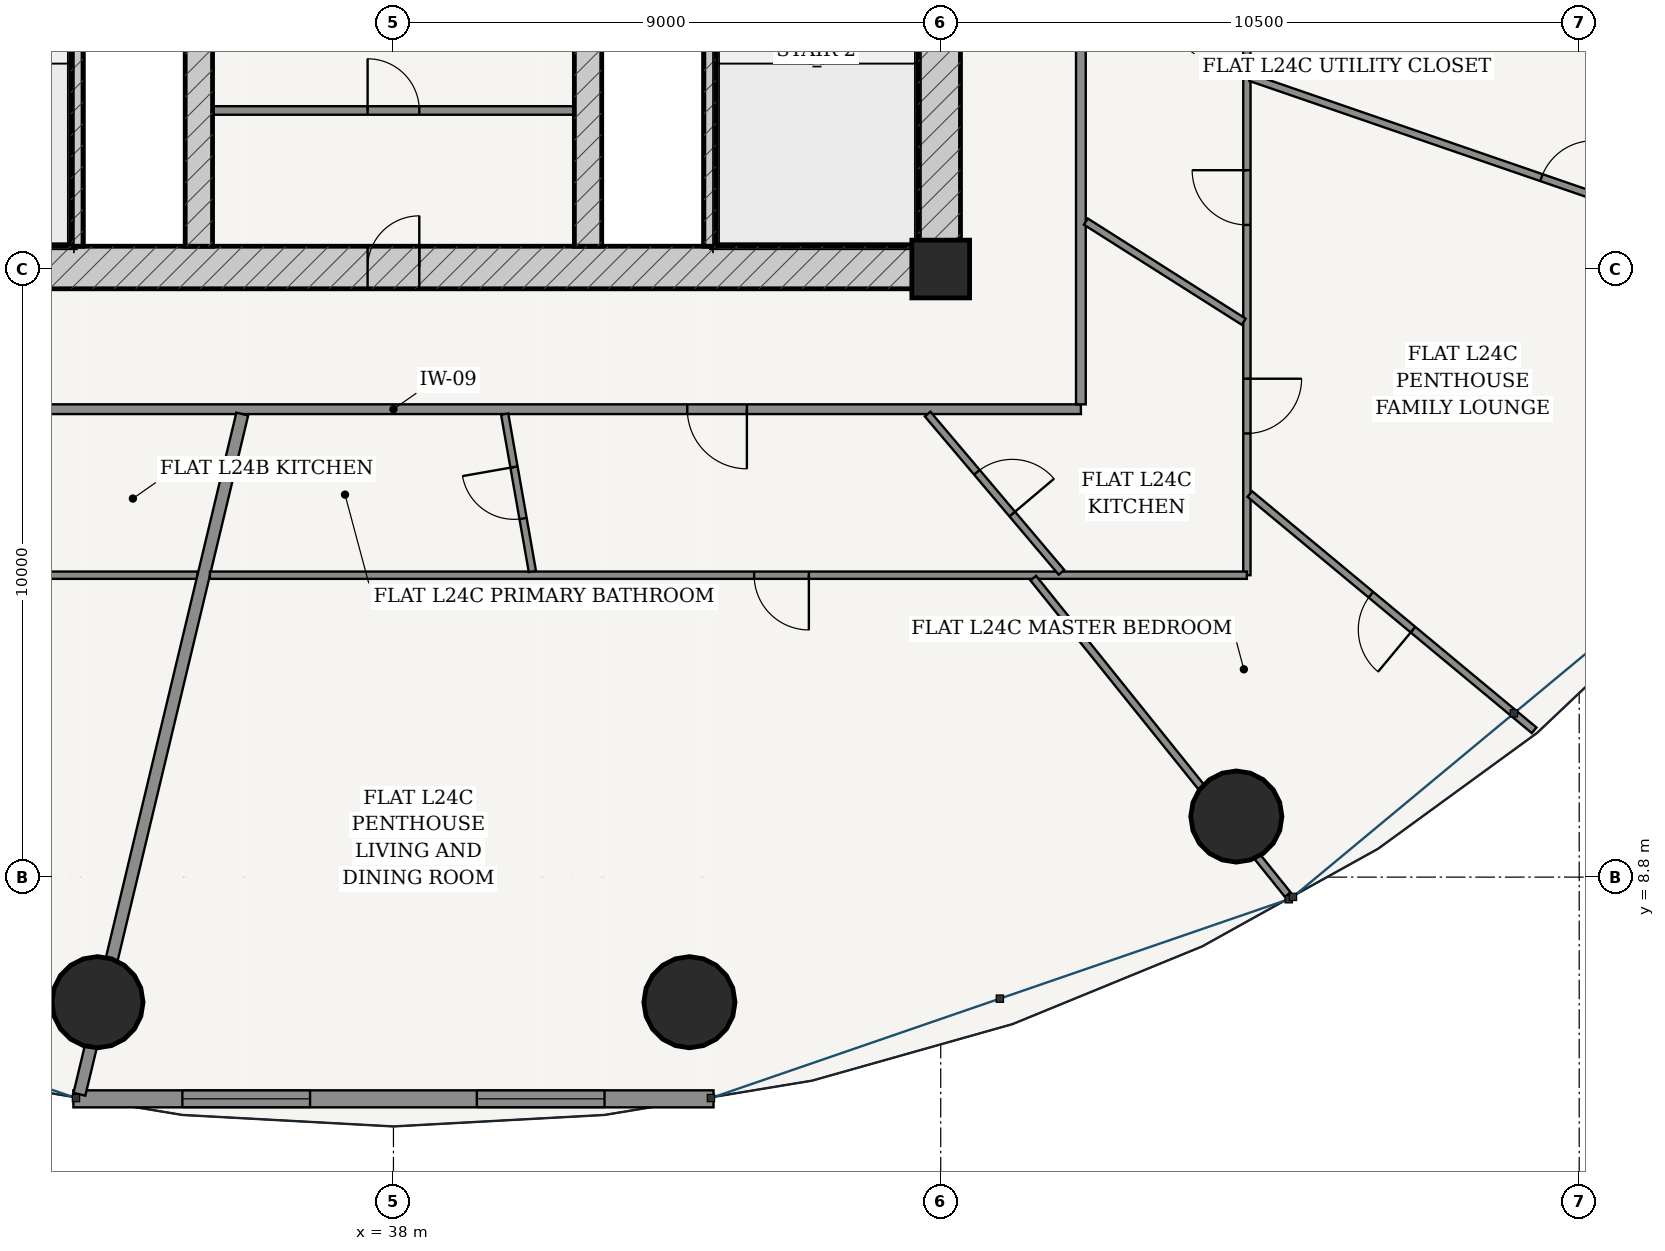
"""IFC4 building model, lengths in metres.
Left out: names, types, materials, properties, quantities, classifications, styles, units other than length and angle.
Written with IfcOpenShell. Run it as: python <this file> out.ifc"""

import sys

from ifc_helpers import new_model, si_unit, direction, frame, frame_2d, origin, origin_2d, place, context, subcontext, project, spatial, rectangle, hollow_circle, extrude, source, transform, mapped, element, fill, save


model = new_model("IFC4")
c1 = context("Model", 3, precision=1e-05, world=origin(), true_north=direction((-0.2419218956, 0.970295726276)))
c2 = subcontext(c1, "Body", "Model", "MODEL_VIEW")
j1 = project(units=[si_unit("LENGTHUNIT", "METRE"), si_unit("PLANEANGLEUNIT", "RADIAN")], contexts=[c1])
p1 = place(None, origin())
s1 = spatial("IfcSite", under=j1, at=p1, CompositionType="ELEMENT")
p2 = place(p1, origin())
s2 = spatial("IfcBuilding", under=s1, at=p2, CompositionType="ELEMENT")
p3 = place(p2, frame((0.0, 0.0, 94.2)))
s3 = spatial("IfcBuildingStorey", under=s2, at=p3, CompositionType="ELEMENT", Elevation=94.2)
p4 = place(p3, frame((47.0, 18.8, 0.0), z_axis=(0.0, 0.0, 1.0), x_axis=(1.0, 0.0, 0.0)))
e1 = element("IfcColumn", 1, at=p4, inside=s3, PredefinedType="COLUMN", context=c2, shape_type="SweptSolid", body=[
    extrude(rectangle(XDim=0.95, YDim=0.95, at=origin_2d()), origin(), (0.0, 0.0, 1.0), 3.6),
])
p5 = place(p3, frame((28.675, 18.825, 0.0), z_axis=(0.0, 0.0, 1.0), x_axis=(1.0, 0.0, 0.0)))
e2 = element("IfcWall", 2, at=p5, inside=s3, PredefinedType="SHEAR", context=c2, shape_type="SweptSolid", body=[
    extrude(rectangle(XDim=18.65, YDim=0.7, at=frame_2d((9.325, 0.0))), origin(), (0.0, 0.0, 1.0), 3.325),
])
p6 = place(p5, frame((8.9, 0.0, 0.0)))
e3 = element("IfcOpeningElement", 3, at=p6, cuts=e2, PredefinedType="OPENING", context=c2, shape_type="SweptSolid", body=[
    extrude(rectangle(XDim=0.85, YDim=2.1, at=frame_2d((0.425, 1.05))), frame((0.0, 0.36, 0.0), z_axis=(0.0, -1.0, 0.0), x_axis=(1.0, 0.0, 0.0)), (0.0, 0.0, 1.0), 0.72),
])
p7 = place(p3, frame((46.975, 19.175, 0.0), z_axis=(0.0, 0.0, 1.0), x_axis=(0.0, 1.0, 0.0)))
e4 = element("IfcWall", 4, at=p7, inside=s3, PredefinedType="SHEAR", context=c2, shape_type="SweptSolid", body=[
    extrude(rectangle(XDim=15.25, YDim=0.7, at=frame_2d((7.625, 0.0))), origin(), (0.0, 0.0, 1.0), 3.325),
])
p8 = place(p7, frame((9.875, 0.0, 0.0)))
e5 = element("IfcOpeningElement", 5, at=p8, cuts=e4, PredefinedType="OPENING", context=c2, shape_type="SweptSolid", body=[
    extrude(rectangle(XDim=1.5, YDim=2.2, at=frame_2d((0.75, 1.1))), frame((0.0, 0.36, 0.0), z_axis=(0.0, -1.0, 0.0), x_axis=(1.0, 0.0, 0.0)), (0.0, 0.0, 1.0), 0.72),
])
for number, where, z_axis, x_axis in (
    (6, (32.795, 19.175, 0.0), (0.0, 0.0, 1.0), (0.0, 1.0, 0.0)),
    (7, (43.205, 19.175, 0.0), (0.0, 0.0, 1.0), (0.0, 1.0, 0.0)),
):
    element("IfcWall", number, at=place(p3, frame(where, z_axis=z_axis, x_axis=x_axis)), inside=s3, PredefinedType="SOLIDWALL", context=c2, shape_type="SweptSolid", body=[
        extrude(rectangle(XDim=7.375, YDim=0.2, at=frame_2d((3.688, 0.0))), origin(), (0.0, 0.0, 1.0), 3.325),
    ])
p9 = place(p3, frame((34.8, 19.175, 0.0), z_axis=(0.0, 0.0, 1.0), x_axis=(0.0, 1.0, 0.0)))
e8 = element("IfcWall", 8, at=p9, inside=s3, PredefinedType="SHEAR", context=c2, shape_type="SweptSolid", body=[
    extrude(rectangle(XDim=15.25, YDim=0.45, at=frame_2d((7.625, 0.0))), origin(), (0.0, 0.0, 1.0), 3.325),
])
p10 = place(p9, frame((7.8, 0.0, 0.0)))
e9 = element("IfcOpeningElement", 9, at=p10, cuts=e8, PredefinedType="OPENING", context=c2, shape_type="SweptSolid", body=[
    extrude(rectangle(XDim=1.05, YDim=2.15, at=frame_2d((0.525, 1.075))), frame((0.0, 0.235, 0.0), z_axis=(0.0, -1.0, 0.0), x_axis=(1.0, 0.0, 0.0)), (0.0, 0.0, 1.0), 0.47),
])
p11 = place(p3, frame((41.2, 19.175, 0.0), z_axis=(0.0, 0.0, 1.0), x_axis=(0.0, 1.0, 0.0)))
e10 = element("IfcWall", 10, at=p11, inside=s3, PredefinedType="SHEAR", context=c2, shape_type="SweptSolid", body=[
    extrude(rectangle(XDim=15.25, YDim=0.45, at=frame_2d((7.625, 0.0))), origin(), (0.0, 0.0, 1.0), 3.325),
])
p12 = place(p11, frame((7.8, 0.0, 0.0)))
e11 = element("IfcOpeningElement", 11, at=p12, cuts=e10, PredefinedType="OPENING", context=c2, shape_type="SweptSolid", body=[
    extrude(rectangle(XDim=1.05, YDim=2.15, at=frame_2d((0.525, 1.075))), frame((0.0, 0.235, 0.0), z_axis=(0.0, -1.0, 0.0), x_axis=(1.0, 0.0, 0.0)), (0.0, 0.0, 1.0), 0.47),
])
for number, where, z_axis, x_axis in (
    (12, (33.133, 6.743, 0.0), (0.0, 0.0, 1.0), (1.0, 0.0, 0.0)),
    (13, (42.867, 6.743, 0.0), (0.0, 0.0, 1.0), (1.0, 0.0, 0.0)),
    (14, (51.862, 9.796, 0.0), (0.0, 0.0, 1.0), (1.0, 0.0, 0.0)),
):
    element("IfcColumn", number, at=place(p3, frame(where, z_axis=z_axis, x_axis=x_axis)), inside=s3, PredefinedType="COLUMN", context=c2, shape_type="SweptSolid", body=[
        extrude(hollow_circle(Radius=0.75, WallThickness=0.045, at=origin_2d()), origin(), (0.0, 0.0, 1.0), 3.6),
    ])
p13 = place(p3, frame((32.736, 5.154, 0.0), z_axis=(0.0, 0.0, 1.0), x_axis=(1.0, 0.0, 0.0)))
e15 = element("IfcWall", 15, at=p13, inside=s3, PredefinedType="SOLIDWALL", context=c2, shape_type="SweptSolid", body=[
    extrude(rectangle(XDim=10.527, YDim=0.28, at=frame_2d((5.264, 0.0))), origin(), (0.0, 0.0, 1.0), 3.325),
])
p14 = place(p13, frame((1.792, 0.0, 0.85)))
e16 = element("IfcOpeningElement", 16, at=p14, cuts=e15, PredefinedType="OPENING", context=c2, shape_type="SweptSolid", body=[
    extrude(rectangle(XDim=2.1, YDim=1.95, at=frame_2d((1.05, 0.975))), frame((0.0, 0.15, 0.0), z_axis=(0.0, -1.0, 0.0), x_axis=(1.0, 0.0, 0.0)), (0.0, 0.0, 1.0), 0.3),
])
p15 = place(p13, frame((6.635, 0.0, 0.85)))
e17 = element("IfcOpeningElement", 17, at=p15, cuts=e15, PredefinedType="OPENING", context=c2, shape_type="SweptSolid", body=[
    extrude(rectangle(XDim=2.1, YDim=1.95, at=frame_2d((1.05, 0.975))), frame((0.0, 0.15, 0.0), z_axis=(0.0, -1.0, 0.0), x_axis=(1.0, 0.0, 0.0)), (0.0, 0.0, 1.0), 0.3),
])
p16 = place(p3, frame((35.025, 21.407, 0.0), z_axis=(0.0, 0.0, 1.0), x_axis=(1.0, 0.0, 0.0)))
e18 = element("IfcWall", 18, at=p16, inside=s3, PredefinedType="PARTITIONING", context=c2, shape_type="SweptSolid", body=[
    extrude(rectangle(XDim=5.95, YDim=0.14, at=frame_2d((2.975, 0.0))), origin(), (0.0, 0.0, 1.0), 3.325),
])
p17 = place(p16, frame((2.55, 0.0, 0.0)))
e19 = element("IfcOpeningElement", 19, at=p17, cuts=e18, PredefinedType="OPENING", context=c2, shape_type="SweptSolid", body=[
    extrude(rectangle(XDim=0.85, YDim=2.1, at=frame_2d((0.425, 1.05))), frame((0.0, 0.08, 0.0), z_axis=(0.0, -1.0, 0.0), x_axis=(1.0, 0.0, 0.0)), (0.0, 0.0, 1.0), 0.16),
])
p18 = place(p3, frame((26.695, 16.495, 0.0), z_axis=(0.0, 0.0, 1.0), x_axis=(1.0, 0.0, 0.0)))
e20 = element("IfcWall", 20, at=p18, inside=s3, PredefinedType="PARTITIONING", context=c2, shape_type="SweptSolid", body=[
    extrude(rectangle(XDim=22.61, YDim=0.16, at=frame_2d((11.305, 0.0))), origin(), (0.0, 0.0, 1.0), 2.767),
])
p19 = place(p18, frame((1.688, 0.0, 0.0)))
e21 = element("IfcOpeningElement", 21, at=p19, cuts=e20, PredefinedType="OPENING", context=c2, shape_type="SweptSolid", body=[
    extrude(rectangle(XDim=0.98, YDim=2.2, at=frame_2d((0.49, 1.1))), frame((0.0, 0.09, 0.0), z_axis=(0.0, -1.0, 0.0), x_axis=(1.0, 0.0, 0.0)), (0.0, 0.0, 1.0), 0.18),
])
p20 = place(p18, frame((16.137, 0.0, 0.0)))
e22 = element("IfcOpeningElement", 22, at=p20, cuts=e20, PredefinedType="OPENING", context=c2, shape_type="SweptSolid", body=[
    extrude(rectangle(XDim=0.98, YDim=2.2, at=frame_2d((0.49, 1.1))), frame((0.0, 0.09, 0.0), z_axis=(0.0, -1.0, 0.0), x_axis=(1.0, 0.0, 0.0)), (0.0, 0.0, 1.0), 0.18),
])
p21 = place(p3, frame((49.305, 16.575, 0.0), z_axis=(0.0, 0.0, 1.0), x_axis=(0.0, 1.0, 0.0)))
e23 = element("IfcWall", 23, at=p21, inside=s3, PredefinedType="PARTITIONING", context=c2, shape_type="SweptSolid", body=[
    extrude(rectangle(XDim=20.45, YDim=0.16, at=frame_2d((10.225, 0.0))), origin(), (0.0, 0.0, 1.0), 2.767),
])
p22 = place(p3, frame((34.777, 13.765, 0.0), z_axis=(0.0, 0.0, 1.0), x_axis=(-1.0, 0.0, 0.0)))
e24 = element("IfcWall", 24, at=p22, inside=s3, PredefinedType="PARTITIONING", context=c2, shape_type="SweptSolid", body=[
    extrude(rectangle(XDim=10.812, YDim=0.12, at=frame_2d((5.406, 0.0))), origin(), (0.0, 0.0, 1.0), 2.767),
])
p23 = place(p22, frame((8.466, 0.0, 0.0)))
e25 = element("IfcOpeningElement", 25, at=p23, cuts=e24, PredefinedType="OPENING", context=c2, shape_type="SweptSolid", body=[
    extrude(rectangle(XDim=0.9, YDim=2.15, at=frame_2d((0.45, 1.075))), frame((0.0, 0.07, 0.0), z_axis=(0.0, -1.0, 0.0), x_axis=(1.0, 0.0, 0.0)), (0.0, 0.0, 1.0), 0.14),
])
p24 = place(p22, frame((2.628, 0.0, 0.0)))
e26 = element("IfcOpeningElement", 26, at=p24, cuts=e24, PredefinedType="OPENING", context=c2, shape_type="SweptSolid", body=[
    extrude(rectangle(XDim=0.9, YDim=2.15, at=frame_2d((0.45, 1.075))), frame((0.0, 0.07, 0.0), z_axis=(0.0, -1.0, 0.0), x_axis=(1.0, 0.0, 0.0)), (0.0, 0.0, 1.0), 0.14),
])
p25 = place(p3, frame((35.514, 16.415, 0.0), z_axis=(0.0, 0.0, 1.0), x_axis=(-0.232829417917, -0.972517589636, 0.0)))
e27 = element("IfcWall", 27, at=p25, inside=s3, PredefinedType="PARTITIONING", context=c2, shape_type="SweptSolid", body=[
    extrude(rectangle(XDim=11.502, YDim=0.2, at=frame_2d((5.751, 0.0))), origin(), (0.0, 0.0, 1.0), 2.767),
])
p26 = place(p3, frame((52.035, 34.49, 0.0), z_axis=(0.0, 0.0, 1.0), x_axis=(0.0, -1.0, 0.0)))
e28 = element("IfcWall", 28, at=p26, inside=s3, PredefinedType="PARTITIONING", context=c2, shape_type="SweptSolid", body=[
    extrude(rectangle(XDim=20.725, YDim=0.12, at=frame_2d((10.362, 0.0))), origin(), (0.0, 0.0, 1.0), 2.767),
])
p27 = place(p26, frame((17.493, 0.0, 0.0)))
e29 = element("IfcOpeningElement", 29, at=p27, cuts=e28, PredefinedType="OPENING", context=c2, shape_type="SweptSolid", body=[
    extrude(rectangle(XDim=0.9, YDim=2.15, at=frame_2d((0.45, 1.075))), frame((0.0, 0.07, 0.0), z_axis=(0.0, -1.0, 0.0), x_axis=(1.0, 0.0, 0.0)), (0.0, 0.0, 1.0), 0.14),
])
p28 = place(p26, frame((14.064, 0.0, 0.0)))
e30 = element("IfcOpeningElement", 30, at=p28, cuts=e28, PredefinedType="OPENING", context=c2, shape_type="SweptSolid", body=[
    extrude(rectangle(XDim=0.9, YDim=2.15, at=frame_2d((0.45, 1.075))), frame((0.0, 0.07, 0.0), z_axis=(0.0, -1.0, 0.0), x_axis=(1.0, 0.0, 0.0)), (0.0, 0.0, 1.0), 0.14),
])
p29 = place(p3, frame((52.035, 13.765, 0.0), z_axis=(0.0, 0.0, 1.0), x_axis=(-1.0, 0.0, 0.0)))
e31 = element("IfcWall", 31, at=p29, inside=s3, PredefinedType="PARTITIONING", context=c2, shape_type="SweptSolid", body=[
    extrude(rectangle(XDim=17.054, YDim=0.12, at=frame_2d((8.527, 0.0))), origin(), (0.0, 0.0, 1.0), 2.767),
])
p30 = place(p29, frame((7.203, 0.0, 0.0)))
e32 = element("IfcOpeningElement", 32, at=p30, cuts=e31, PredefinedType="OPENING", context=c2, shape_type="SweptSolid", body=[
    extrude(rectangle(XDim=0.9, YDim=2.15, at=frame_2d((0.45, 1.075))), frame((0.0, 0.07, 0.0), z_axis=(0.0, -1.0, 0.0), x_axis=(1.0, 0.0, 0.0)), (0.0, 0.0, 1.0), 0.14),
])
p31 = place(p3, frame((48.522, 13.717, 0.0), z_axis=(0.0, 0.0, 1.0), x_axis=(0.626707979732, -0.77925419995, 0.0)))
e33 = element("IfcWall", 33, at=p31, inside=s3, PredefinedType="PARTITIONING", context=c2, shape_type="SweptSolid", body=[
    extrude(rectangle(XDim=6.679, YDim=0.12, at=frame_2d((3.339, 0.0))), origin(), (0.0, 0.0, 1.0), 2.767),
])
p32 = place(p3, frame((52.083, 15.1, 0.0), z_axis=(0.0, 0.0, 1.0), x_axis=(0.769161827891, -0.63905405289, 0.0)))
e34 = element("IfcWall", 34, at=p32, inside=s3, PredefinedType="PARTITIONING", context=c2, shape_type="SweptSolid", body=[
    extrude(rectangle(XDim=6.08, YDim=0.12, at=frame_2d((3.04, 0.0))), origin(), (0.0, 0.0, 1.0), 2.767),
])
p33 = place(p32, frame((2.59, 0.0, 0.0)))
e35 = element("IfcOpeningElement", 35, at=p33, cuts=e34, PredefinedType="OPENING", context=c2, shape_type="SweptSolid", body=[
    extrude(rectangle(XDim=0.9, YDim=2.15, at=frame_2d((0.45, 1.075))), frame((0.0, 0.07, 0.0), z_axis=(0.0, -1.0, 0.0), x_axis=(1.0, 0.0, 0.0)), (0.0, 0.0, 1.0), 0.14),
])
p34 = place(p3, frame((52.094, 21.95, 0.0), z_axis=(0.0, 0.0, 1.0), x_axis=(0.945573120726, -0.32540970078, 0.0)))
e36 = element("IfcWall", 36, at=p34, inside=s3, PredefinedType="PARTITIONING", context=c2, shape_type="SweptSolid", body=[
    extrude(rectangle(XDim=11.022, YDim=0.12, at=frame_2d((5.511, 0.0))), origin(), (0.0, 0.0, 1.0), 2.767),
])
p35 = place(p34, frame((5.061, 0.0, 0.0)))
e37 = element("IfcOpeningElement", 37, at=p35, cuts=e36, PredefinedType="OPENING", context=c2, shape_type="SweptSolid", body=[
    extrude(rectangle(XDim=0.9, YDim=2.15, at=frame_2d((0.45, 1.075))), frame((0.0, 0.07, 0.0), z_axis=(0.0, -1.0, 0.0), x_axis=(1.0, 0.0, 0.0)), (0.0, 0.0, 1.0), 0.14),
])
p36 = place(p3, frame((39.829, 16.415, 0.0), z_axis=(0.0, 0.0, 1.0), x_axis=(0.173488627881, -0.984835872618, 0.0)))
e38 = element("IfcWall", 38, at=p36, inside=s3, PredefinedType="PARTITIONING", context=c2, shape_type="SweptSolid", body=[
    extrude(rectangle(XDim=2.629, YDim=0.12, at=frame_2d((1.314, 0.0))), origin(), (0.0, 0.0, 1.0), 3.325),
])
p37 = place(p36, frame((0.885, 0.0, 0.0)))
e39 = element("IfcOpeningElement", 39, at=p37, cuts=e38, PredefinedType="OPENING", context=c2, shape_type="SweptSolid", body=[
    extrude(rectangle(XDim=0.86, YDim=2.15, at=frame_2d((0.43, 1.075))), frame((0.0, 0.07, 0.0), z_axis=(0.0, -1.0, 0.0), x_axis=(1.0, 0.0, 0.0)), (0.0, 0.0, 1.0), 0.14),
])
p38 = place(p3, frame((46.785, 16.415, 0.0), z_axis=(0.0, 0.0, 1.0), x_axis=(0.64582345164, -0.76348678398, 0.0)))
e40 = element("IfcWall", 40, at=p38, inside=s3, PredefinedType="PARTITIONING", context=c2, shape_type="SweptSolid", body=[
    extrude(rectangle(XDim=3.409, YDim=0.12, at=frame_2d((1.705, 0.0))), origin(), (0.0, 0.0, 1.0), 3.004),
])
p39 = place(p38, frame((1.254, 0.0, 0.0)))
e41 = element("IfcOpeningElement", 41, at=p39, cuts=e40, PredefinedType="OPENING", context=c2, shape_type="SweptSolid", body=[
    extrude(rectangle(XDim=0.9, YDim=2.15, at=frame_2d((0.45, 1.075))), frame((0.0, 0.07, 0.0), z_axis=(0.0, -1.0, 0.0), x_axis=(1.0, 0.0, 0.0)), (0.0, 0.0, 1.0), 0.14),
])
p40 = place(p3, frame((49.387, 19.58, 0.0), z_axis=(0.0, 0.0, 1.0), x_axis=(0.844540118368, -0.535492286094, 0.0)))
e42 = element("IfcWall", 42, at=p40, inside=s3, PredefinedType="PARTITIONING", context=c2, shape_type="SweptSolid", body=[
    extrude(rectangle(XDim=3.074, YDim=0.12, at=frame_2d((1.537, 0.0))), origin(), (0.0, 0.0, 1.0), 3.325),
])
m1 = source(origin(), c2, "Body", "SweptSolid", [
    extrude(rectangle(XDim=2.1, YDim=1.95, at=frame_2d((1.05, 0.975))), frame((0.0, 0.03, 0.0), z_axis=(0.0, -1.0, 0.0), x_axis=(1.0, 0.0, 0.0)), (0.0, 0.0, 1.0), 0.06),
])
p41 = place(p14, origin())
e43 = element("IfcWindow", 43, at=p41, inside=s3, PartitioningType="SINGLE_PANEL", PredefinedType="WINDOW", context=c2, shape_type="MappedRepresentation", body=[
    mapped(m1, transform((0.0, 0.0, 0.0), scale=1.0)),
])
fill(e16, e43)
p42 = place(p15, origin())
e44 = element("IfcWindow", 44, at=p42, inside=s3, PartitioningType="SINGLE_PANEL", PredefinedType="WINDOW", context=c2, shape_type="MappedRepresentation", body=[
    mapped(m1, transform((0.0, 0.0, 0.0), scale=1.0)),
])
fill(e17, e44)
m2 = source(origin(), c2, "Body", "SweptSolid", [
    extrude(rectangle(XDim=0.85, YDim=2.1, at=frame_2d((0.425, 1.05))), frame((0.0, 0.025, 0.0), z_axis=(0.0, -1.0, 0.0), x_axis=(1.0, 0.0, 0.0)), (0.0, 0.0, 1.0), 0.05),
])
p43 = place(p6, origin())
e45 = element("IfcDoor", 45, at=p43, inside=s3, OperationType="SINGLE_SWING_RIGHT", PredefinedType="DOOR", context=c2, shape_type="MappedRepresentation", body=[
    mapped(m2, transform((0.0, 0.0, 0.0), scale=1.0)),
])
fill(e3, e45)
p44 = place(p17, origin())
e46 = element("IfcDoor", 46, at=p44, inside=s3, OperationType="SINGLE_SWING_LEFT", PredefinedType="DOOR", context=c2, shape_type="MappedRepresentation", body=[
    mapped(m2, transform((0.0, 0.0, 0.0), scale=1.0)),
])
fill(e19, e46)
m3 = source(origin(), c2, "Body", "SweptSolid", [
    extrude(rectangle(XDim=0.98, YDim=2.2, at=frame_2d((0.49, 1.1))), frame((0.0, 0.025, 0.0), z_axis=(0.0, -1.0, 0.0), x_axis=(1.0, 0.0, 0.0)), (0.0, 0.0, 1.0), 0.05),
])
p45 = place(p20, frame((0.98, 0.0, 0.0), z_axis=(0.0, 0.0, 1.0), x_axis=(-1.0, 0.0, 0.0)))
e47 = element("IfcDoor", 47, at=p45, inside=s3, OperationType="SINGLE_SWING_LEFT", PredefinedType="DOOR", context=c2, shape_type="MappedRepresentation", body=[
    mapped(m3, transform((0.0, 0.0, 0.0), scale=1.0)),
])
fill(e22, e47)
m4 = source(origin(), c2, "Body", "SweptSolid", [
    extrude(rectangle(XDim=0.86, YDim=2.15, at=frame_2d((0.43, 1.075))), frame((0.0, 0.025, 0.0), z_axis=(0.0, -1.0, 0.0), x_axis=(1.0, 0.0, 0.0)), (0.0, 0.0, 1.0), 0.05),
])
p46 = place(p37, frame((0.86, 0.0, 0.0), z_axis=(0.0, 0.0, 1.0), x_axis=(-1.0, 0.0, 0.0)))
e48 = element("IfcDoor", 48, at=p46, inside=s3, OperationType="SINGLE_SWING_RIGHT", PredefinedType="DOOR", context=c2, shape_type="MappedRepresentation", body=[
    mapped(m4, transform((0.0, 0.0, 0.0), scale=1.0)),
])
fill(e39, e48)
m5 = source(origin(), c2, "Body", "SweptSolid", [
    extrude(rectangle(XDim=0.9, YDim=2.15, at=frame_2d((0.45, 1.075))), frame((0.0, 0.025, 0.0), z_axis=(0.0, -1.0, 0.0), x_axis=(1.0, 0.0, 0.0)), (0.0, 0.0, 1.0), 0.05),
])
p47 = place(p30, origin())
e49 = element("IfcDoor", 49, at=p47, inside=s3, OperationType="SINGLE_SWING_LEFT", PredefinedType="DOOR", context=c2, shape_type="MappedRepresentation", body=[
    mapped(m5, transform((0.0, 0.0, 0.0), scale=1.0)),
])
fill(e32, e49)
p48 = place(p39, origin())
e50 = element("IfcDoor", 50, at=p48, inside=s3, OperationType="SINGLE_SWING_RIGHT", PredefinedType="DOOR", context=c2, shape_type="MappedRepresentation", body=[
    mapped(m5, transform((0.0, 0.0, 0.0), scale=1.0)),
])
fill(e41, e50)
p49 = place(p27, origin())
e51 = element("IfcDoor", 51, at=p49, inside=s3, OperationType="SINGLE_SWING_LEFT", PredefinedType="DOOR", context=c2, shape_type="MappedRepresentation", body=[
    mapped(m5, transform((0.0, 0.0, 0.0), scale=1.0)),
])
fill(e29, e51)
p50 = place(p28, frame((0.9, 0.0, 0.0), z_axis=(0.0, 0.0, 1.0), x_axis=(-1.0, 0.0, 0.0)))
e52 = element("IfcDoor", 52, at=p50, inside=s3, OperationType="SINGLE_SWING_RIGHT", PredefinedType="DOOR", context=c2, shape_type="MappedRepresentation", body=[
    mapped(m5, transform((0.0, 0.0, 0.0), scale=1.0)),
])
fill(e30, e52)
p51 = place(p33, frame((0.9, 0.0, 0.0), z_axis=(0.0, 0.0, 1.0), x_axis=(-1.0, 0.0, 0.0)))
e53 = element("IfcDoor", 53, at=p51, inside=s3, OperationType="SINGLE_SWING_LEFT", PredefinedType="DOOR", context=c2, shape_type="MappedRepresentation", body=[
    mapped(m5, transform((0.0, 0.0, 0.0), scale=1.0)),
])
fill(e35, e53)
p52 = place(p35, origin())
e54 = element("IfcDoor", 54, at=p52, inside=s3, OperationType="SINGLE_SWING_RIGHT", PredefinedType="DOOR", context=c2, shape_type="MappedRepresentation", body=[
    mapped(m5, transform((0.0, 0.0, 0.0), scale=1.0)),
])
fill(e37, e54)
save(model, sys.argv[1])
